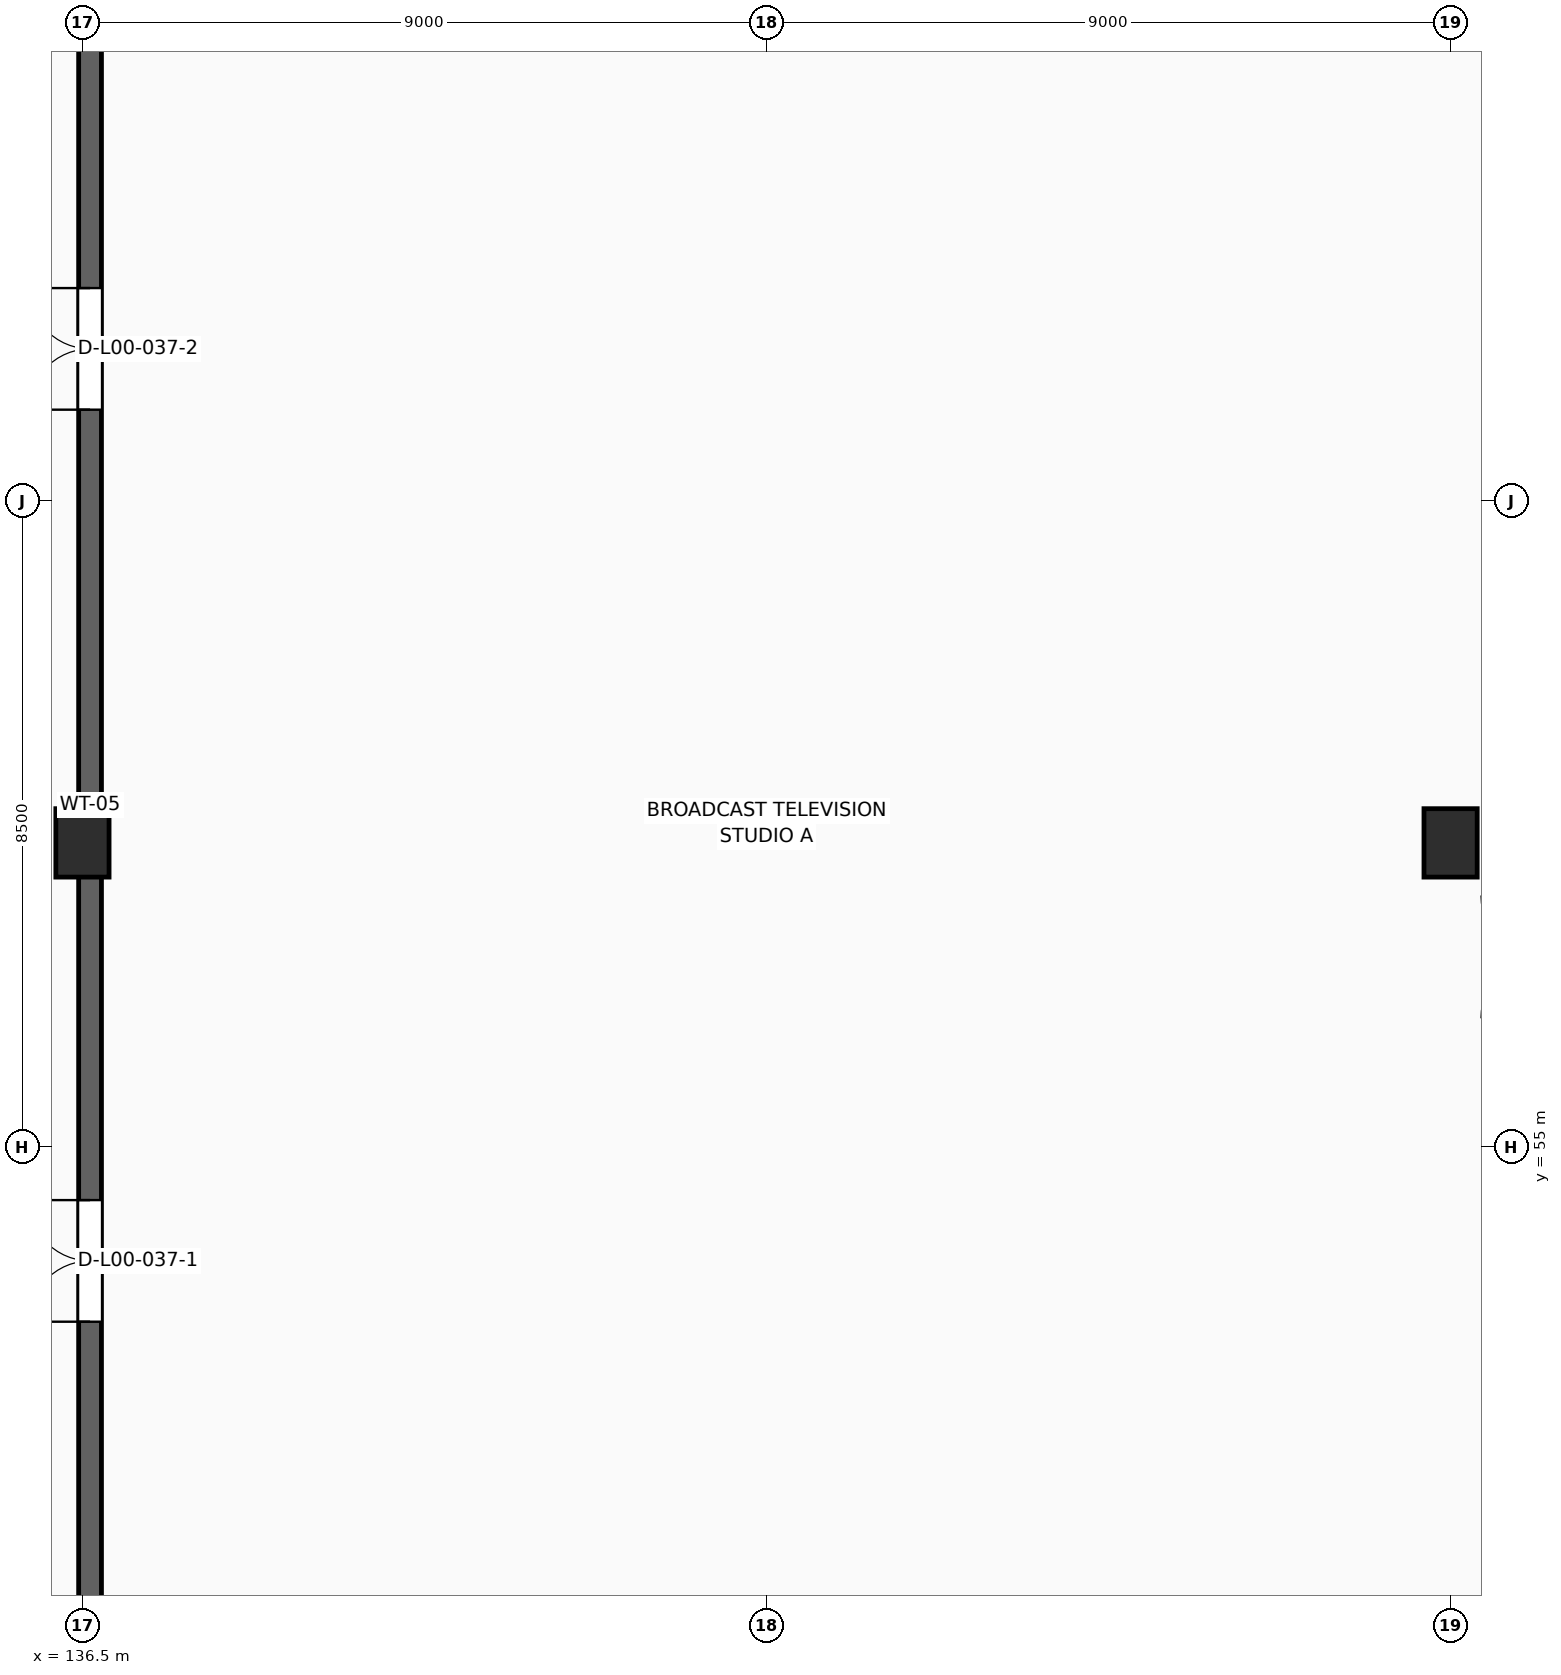
"""IFC4 building model, lengths in metres.
Left out: names, types, materials, properties, quantities, classifications, styles, units other than length and angle.
Written with IfcOpenShell. Run it as: python <this file> out.ifc"""

import sys

from ifc_helpers import new_model, si_unit, direction, frame, frame_2d, origin, origin_2d, place, context, subcontext, project, spatial, rectangle, extrude, element, fill, save


model = new_model("IFC4")
c1 = context("Model", 3, precision=1e-05, world=origin(), true_north=direction((0.0, 1.0)))
c2 = subcontext(c1, "Body", "Model", "MODEL_VIEW")
j1 = project(units=[si_unit("LENGTHUNIT", "METRE"), si_unit("PLANEANGLEUNIT", "RADIAN")], contexts=[c1])
p1 = place(None, origin())
s1 = spatial("IfcSite", under=j1, at=p1, CompositionType="ELEMENT")
p2 = place(p1, origin())
s2 = spatial("IfcBuilding", under=s1, at=p2, CompositionType="ELEMENT")
p3 = place(p2, origin())
s3 = spatial("IfcBuildingStorey", under=s2, at=p3, CompositionType="ELEMENT", Elevation=0.0)
for number, where, z_axis, x_axis in (
    (1, (136.5, 59.0, 0.0), (0.0, 0.0, 1.0), (1.0, 0.0, 0.0)),
    (2, (154.5, 59.0, 0.0), (0.0, 0.0, 1.0), (1.0, 0.0, 0.0)),
):
    element("IfcColumn", number, at=place(p3, frame(where, z_axis=z_axis, x_axis=x_axis)), inside=s3, PredefinedType="COLUMN", context=c2, shape_type="SweptSolid", body=[
        extrude(rectangle(XDim=0.7, YDim=0.9, at=origin_2d()), origin(), (0.0, 0.0, 1.0), 5.1),
    ])
p4 = place(p3, frame((136.6, 46.7, 0.0), z_axis=(0.0, 0.0, 1.0), x_axis=(0.0, 1.0, 0.0)))
e3 = element("IfcWall", 3, at=p4, inside=s3, PredefinedType="STANDARD", context=c2, shape_type="SweptSolid", body=[
    extrude(rectangle(XDim=25.0, YDim=0.3, at=frame_2d((12.5, 0.0))), origin(), (0.0, 0.0, 1.0), 5.1),
])
p5 = place(p4, frame((6.0, 0.0, 0.0)))
e4 = element("IfcOpeningElement", 4, at=p5, cuts=e3, PredefinedType="OPENING", context=c2, shape_type="SweptSolid", body=[
    extrude(rectangle(XDim=1.6, YDim=2.4, at=frame_2d((0.8, 1.2))), frame((0.0, 0.162, 0.0), z_axis=(0.0, -1.0, 0.0), x_axis=(1.0, 0.0, 0.0)), (0.0, 0.0, 1.0), 0.324),
])
p6 = place(p4, frame((18.0, 0.0, 0.0)))
e5 = element("IfcOpeningElement", 5, at=p6, cuts=e3, PredefinedType="OPENING", context=c2, shape_type="SweptSolid", body=[
    extrude(rectangle(XDim=1.6, YDim=2.4, at=frame_2d((0.8, 1.2))), frame((0.0, 0.162, 0.0), z_axis=(0.0, -1.0, 0.0), x_axis=(1.0, 0.0, 0.0)), (0.0, 0.0, 1.0), 0.324),
])
p7 = place(p5, origin())
e6 = element("IfcDoor", 6, at=p7, inside=s3, OperationType="DOUBLE_DOOR_SINGLE_SWING", PredefinedType="DOOR", context=c2, shape_type="SweptSolid", body=[
    extrude(rectangle(XDim=1.6, YDim=2.4, at=frame_2d((0.8, 1.2))), frame((0.0, 0.025, 0.0), z_axis=(0.0, -1.0, 0.0), x_axis=(1.0, 0.0, 0.0)), (0.0, 0.0, 1.0), 0.05),
])
fill(e4, e6)
p8 = place(p6, origin())
e7 = element("IfcDoor", 7, at=p8, inside=s3, OperationType="DOUBLE_DOOR_SINGLE_SWING", PredefinedType="DOOR", context=c2, shape_type="SweptSolid", body=[
    extrude(rectangle(XDim=1.6, YDim=2.4, at=frame_2d((0.8, 1.2))), frame((0.0, 0.025, 0.0), z_axis=(0.0, -1.0, 0.0), x_axis=(1.0, 0.0, 0.0)), (0.0, 0.0, 1.0), 0.05),
])
fill(e5, e7)
save(model, sys.argv[1])
